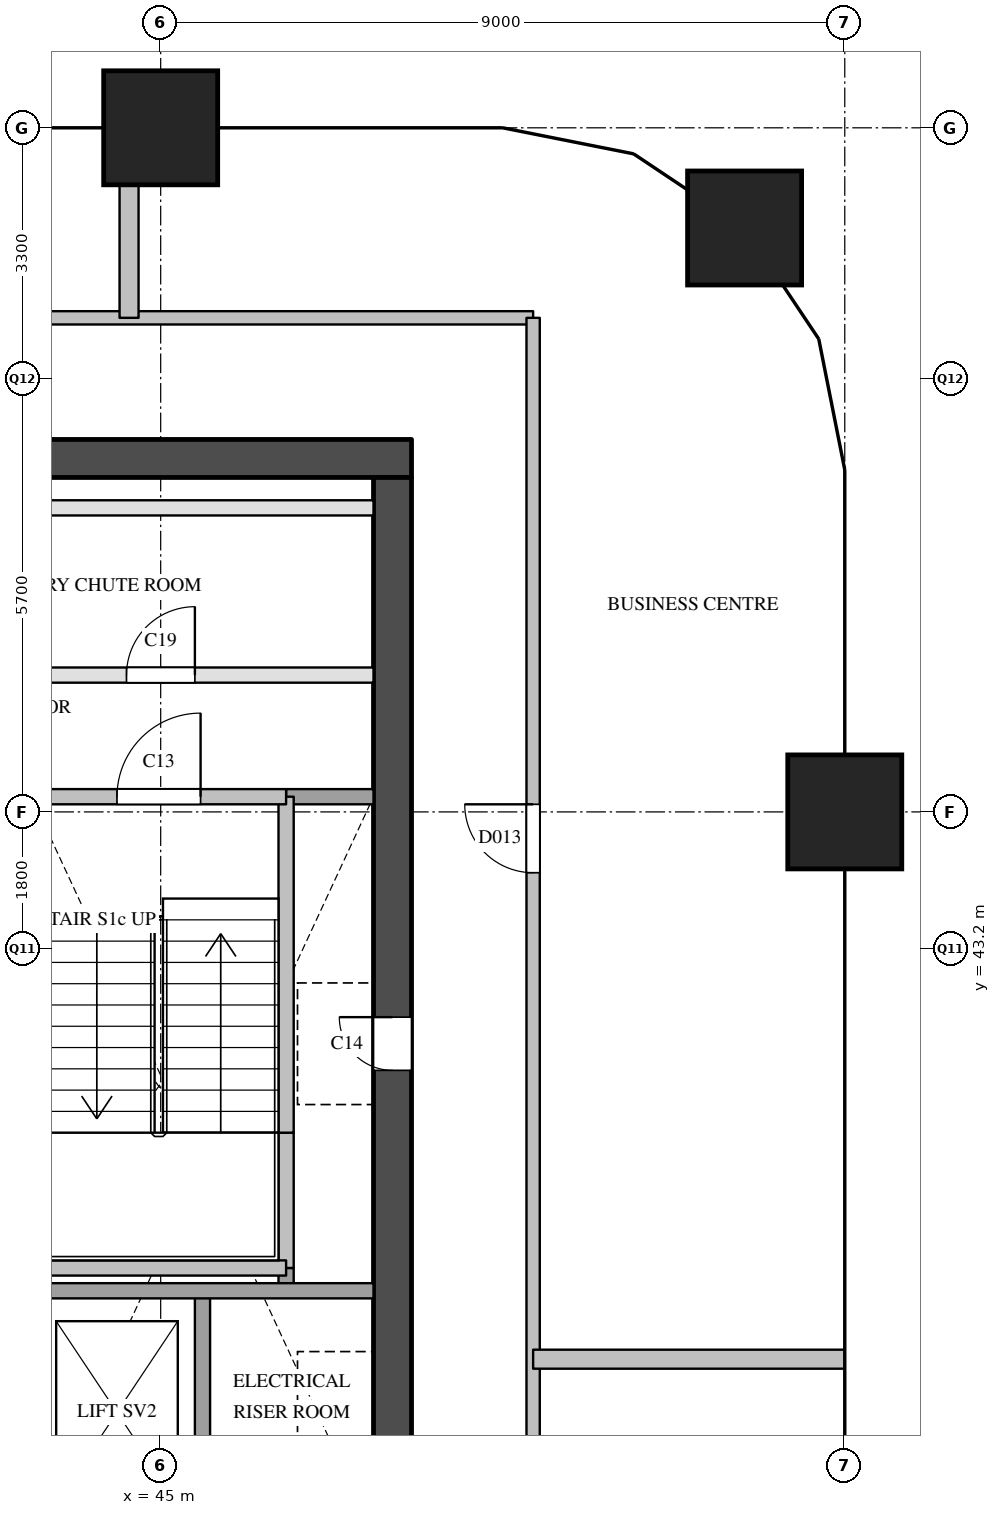
"""IFC4 building model, lengths in metres.
Left out: names, types, materials, properties, quantities, classifications, styles, units other than length and angle.
Written with IfcOpenShell. Run it as: python <this file> out.ifc"""

import sys

from ifc_helpers import new_model, si_unit, direction, frame, frame_2d, origin, origin_2d, place, context, subcontext, project, spatial, rectangle, extrude, element, fill, save


model = new_model("IFC4")
c1 = context("Model", 3, precision=1e-05, world=origin(), true_north=direction((0.0, 1.0)))
c2 = subcontext(c1, "Body", "Model", "MODEL_VIEW")
j1 = project(units=[si_unit("LENGTHUNIT", "METRE"), si_unit("PLANEANGLEUNIT", "RADIAN")], contexts=[c1])
p1 = place(None, origin())
s1 = spatial("IfcSite", under=j1, at=p1, CompositionType="ELEMENT")
p2 = place(p1, origin())
s2 = spatial("IfcBuilding", under=s1, at=p2, CompositionType="ELEMENT")
p3 = place(p2, frame((0.0, 0.0, 189.5)))
s3 = spatial("IfcBuildingStorey", under=s2, at=p3, CompositionType="ELEMENT", Elevation=189.5)
for number, where, z_axis, x_axis in (
    (1, (45.0, 54.0, 0.0), (0.0, 0.0, 1.0), (1.0, 0.0, 0.0)),
    (2, (54.0, 45.0, 0.0), (0.0, 0.0, 1.0), (1.0, 0.0, 0.0)),
    (3, (52.682, 52.682, 0.0), (0.0, 0.0, 1.0), (1.0, 0.0, 0.0)),
):
    element("IfcColumn", number, at=place(p3, frame(where, z_axis=z_axis, x_axis=x_axis)), inside=s3, PredefinedType="COLUMN", context=c2, shape_type="SweptSolid", body=[
        extrude(rectangle(XDim=1.5, YDim=1.5, at=origin_2d()), origin(), (0.0, 0.0, 1.0), 3.9),
    ])
p4 = place(p3, frame((36.1, 49.65, 0.0), z_axis=(0.0, 0.0, 1.0), x_axis=(1.0, 0.0, 0.0)))
e4 = element("IfcWall", 4, at=p4, inside=s3, PredefinedType="SHEAR", context=c2, shape_type="SweptSolid", body=[
    extrude(rectangle(XDim=12.2, YDim=0.5, at=frame_2d((6.1, 0.0))), origin(), (0.0, 0.0, 1.0), 3.6),
])
p5 = place(p3, frame((48.05, 29.1, 0.0), z_axis=(0.0, 0.0, 1.0), x_axis=(0.0, 1.0, 0.0)))
e5 = element("IfcWall", 5, at=p5, inside=s3, PredefinedType="SHEAR", context=c2, shape_type="SweptSolid", body=[
    extrude(rectangle(XDim=20.3, YDim=0.5, at=frame_2d((10.15, 0.0))), origin(), (0.0, 0.0, 1.0), 3.6),
])
p6 = place(p5, frame((12.5, 0.0, 0.0)))
e6 = element("IfcOpeningElement", 6, at=p6, cuts=e5, PredefinedType="OPENING", context=c2, shape_type="SweptSolid", body=[
    extrude(rectangle(XDim=0.7, YDim=2.1, at=frame_2d((0.35, 1.05))), frame((0.0, 0.26, 0.0), z_axis=(0.0, -1.0, 0.0), x_axis=(1.0, 0.0, 0.0)), (0.0, 0.0, 1.0), 0.52),
])
p7 = place(p5, frame((3.9, 0.0, 0.0)))
e7 = element("IfcOpeningElement", 7, at=p7, cuts=e5, PredefinedType="OPENING", context=c2, shape_type="SweptSolid", body=[
    extrude(rectangle(XDim=1.8, YDim=2.1, at=frame_2d((0.9, 1.05))), frame((0.0, 0.26, 0.0), z_axis=(0.0, -1.0, 0.0), x_axis=(1.0, 0.0, 0.0)), (0.0, 0.0, 1.0), 0.52),
])
p8 = place(p3, frame((45.55, 35.5, 0.0), z_axis=(0.0, 0.0, 1.0), x_axis=(0.0, 1.0, 0.0)))
e8 = element("IfcWall", 8, at=p8, inside=s3, PredefinedType="SOLIDWALL", context=c2, shape_type="SweptSolid", body=[
    extrude(rectangle(XDim=3.2, YDim=0.2, at=frame_2d((1.6, 0.0))), origin(), (0.0, 0.0, 1.0), 3.6),
])
p9 = place(p3, frame((46.65, 38.7, 0.0), z_axis=(0.0, 0.0, 1.0), x_axis=(0.0, 1.0, 0.0)))
e9 = element("IfcWall", 9, at=p9, inside=s3, PredefinedType="SOLIDWALL", context=c2, shape_type="SweptSolid", body=[
    extrude(rectangle(XDim=0.3, YDim=0.2, at=frame_2d((0.15, 0.0))), origin(), (0.0, 0.0, 1.0), 3.6),
])
p10 = place(p3, frame((46.65, 39.0, 0.0), z_axis=(0.0, 0.0, 1.0), x_axis=(0.0, 1.0, 0.0)))
e10 = element("IfcWall", 10, at=p10, inside=s3, PredefinedType="SOLIDWALL", context=c2, shape_type="SweptSolid", body=[
    extrude(rectangle(XDim=1.78, YDim=0.2, at=frame_2d((0.89, 0.0))), origin(), (0.0, 0.0, 1.0), 3.6),
])
p11 = place(p3, frame((46.65, 40.78, 0.0), z_axis=(0.0, 0.0, 1.0), x_axis=(0.0, 1.0, 0.0)))
e11 = element("IfcWall", 11, at=p11, inside=s3, PredefinedType="SOLIDWALL", context=c2, shape_type="SweptSolid", body=[
    extrude(rectangle(XDim=4.42, YDim=0.2, at=frame_2d((2.21, 0.0))), origin(), (0.0, 0.0, 1.0), 3.6),
])
p12 = place(p3, frame((43.3, 38.7, 0.0), z_axis=(0.0, 0.0, 1.0), x_axis=(1.0, 0.0, 0.0)))
e12 = element("IfcWall", 12, at=p12, inside=s3, PredefinedType="SOLIDWALL", context=c2, shape_type="SweptSolid", body=[
    extrude(rectangle(XDim=4.5, YDim=0.2, at=frame_2d((2.25, 0.0))), origin(), (0.0, 0.0, 1.0), 3.6),
])
p13 = place(p3, frame((43.4, 39.0, 0.0), z_axis=(0.0, 0.0, 1.0), x_axis=(1.0, 0.0, 0.0)))
e13 = element("IfcWall", 13, at=p13, inside=s3, PredefinedType="SOLIDWALL", context=c2, shape_type="SweptSolid", body=[
    extrude(rectangle(XDim=3.25, YDim=0.2, at=frame_2d((1.625, 0.0))), origin(), (0.0, 0.0, 1.0), 3.6),
])
p14 = place(p3, frame((46.65, 45.2, 0.0), z_axis=(0.0, 0.0, 1.0), x_axis=(1.0, 0.0, 0.0)))
e14 = element("IfcWall", 14, at=p14, inside=s3, PredefinedType="SOLIDWALL", context=c2, shape_type="SweptSolid", body=[
    extrude(rectangle(XDim=1.15, YDim=0.2, at=frame_2d((0.575, 0.0))), origin(), (0.0, 0.0, 1.0), 3.6),
])
p15 = place(p3, frame((36.6, 45.2, 0.0), z_axis=(0.0, 0.0, 1.0), x_axis=(1.0, 0.0, 0.0)))
e15 = element("IfcWall", 15, at=p15, inside=s3, PredefinedType="SOLIDWALL", context=c2, shape_type="SweptSolid", body=[
    extrude(rectangle(XDim=10.05, YDim=0.2, at=frame_2d((5.025, 0.0))), origin(), (0.0, 0.0, 1.0), 3.6),
])
p16 = place(p15, frame((1.125, 0.0, 0.0)))
e16 = element("IfcOpeningElement", 16, at=p16, cuts=e15, PredefinedType="OPENING", context=c2, shape_type="SweptSolid", body=[
    extrude(rectangle(XDim=1.1, YDim=2.1, at=frame_2d((0.55, 1.05))), frame((0.0, 0.11, 0.0), z_axis=(0.0, -1.0, 0.0), x_axis=(1.0, 0.0, 0.0)), (0.0, 0.0, 1.0), 0.22),
])
p17 = place(p15, frame((4.475, 0.0, 0.0)))
e17 = element("IfcOpeningElement", 17, at=p17, cuts=e15, PredefinedType="OPENING", context=c2, shape_type="SweptSolid", body=[
    extrude(rectangle(XDim=1.1, YDim=2.1, at=frame_2d((0.55, 1.05))), frame((0.0, 0.11, 0.0), z_axis=(0.0, -1.0, 0.0), x_axis=(1.0, 0.0, 0.0)), (0.0, 0.0, 1.0), 0.22),
])
p18 = place(p15, frame((7.825, 0.0, 0.0)))
e18 = element("IfcOpeningElement", 18, at=p18, cuts=e15, PredefinedType="OPENING", context=c2, shape_type="SweptSolid", body=[
    extrude(rectangle(XDim=1.1, YDim=2.1, at=frame_2d((0.55, 1.05))), frame((0.0, 0.11, 0.0), z_axis=(0.0, -1.0, 0.0), x_axis=(1.0, 0.0, 0.0)), (0.0, 0.0, 1.0), 0.22),
])
p19 = place(p3, frame((36.6, 46.8, 0.0), z_axis=(0.0, 0.0, 1.0), x_axis=(1.0, 0.0, 0.0)))
e19 = element("IfcWall", 19, at=p19, inside=s3, PredefinedType="PARTITIONING", context=c2, shape_type="SweptSolid", body=[
    extrude(rectangle(XDim=11.2, YDim=0.2, at=frame_2d((5.6, 0.0))), origin(), (0.0, 0.0, 1.0), 3.6),
])
p20 = place(p19, frame((2.35, 0.0, 0.0)))
e20 = element("IfcOpeningElement", 20, at=p20, cuts=e19, PredefinedType="OPENING", context=c2, shape_type="SweptSolid", body=[
    extrude(rectangle(XDim=0.9, YDim=2.1, at=frame_2d((0.45, 1.05))), frame((0.0, 0.11, 0.0), z_axis=(0.0, -1.0, 0.0), x_axis=(1.0, 0.0, 0.0)), (0.0, 0.0, 1.0), 0.22),
])
p21 = place(p19, frame((7.95, 0.0, 0.0)))
e21 = element("IfcOpeningElement", 21, at=p21, cuts=e19, PredefinedType="OPENING", context=c2, shape_type="SweptSolid", body=[
    extrude(rectangle(XDim=0.9, YDim=2.1, at=frame_2d((0.45, 1.05))), frame((0.0, 0.11, 0.0), z_axis=(0.0, -1.0, 0.0), x_axis=(1.0, 0.0, 0.0)), (0.0, 0.0, 1.0), 0.22),
])
p22 = place(p3, frame((36.6, 49.0, 0.0), z_axis=(0.0, 0.0, 1.0), x_axis=(1.0, 0.0, 0.0)))
e22 = element("IfcWall", 22, at=p22, inside=s3, PredefinedType="PARTITIONING", context=c2, shape_type="SweptSolid", body=[
    extrude(rectangle(XDim=11.2, YDim=0.2, at=frame_2d((5.6, 0.0))), origin(), (0.0, 0.0, 1.0), 3.6),
])
p23 = place(p3, frame((34.5, 51.5, 0.0), z_axis=(0.0, 0.0, 1.0), x_axis=(1.0, 0.0, 0.0)))
e23 = element("IfcWall", 23, at=p23, inside=s3, PredefinedType="PARTITIONING", context=c2, shape_type="SweptSolid", body=[
    extrude(rectangle(XDim=15.4, YDim=0.175, at=frame_2d((7.7, 0.0))), origin(), (0.0, 0.0, 1.0), 3.6),
])
p24 = place(p23, frame((4.542, 0.0, 0.0)))
e24 = element("IfcOpeningElement", 24, at=p24, cuts=e23, PredefinedType="OPENING", context=c2, shape_type="SweptSolid", body=[
    extrude(rectangle(XDim=1.0, YDim=2.1, at=frame_2d((0.5, 1.05))), frame((0.0, 0.097, 0.0), z_axis=(0.0, -1.0, 0.0), x_axis=(1.0, 0.0, 0.0)), (0.0, 0.0, 1.0), 0.195),
])
p25 = place(p3, frame((49.9, 28.5, 0.0), z_axis=(0.0, 0.0, 1.0), x_axis=(0.0, 1.0, 0.0)))
e25 = element("IfcWall", 25, at=p25, inside=s3, PredefinedType="PARTITIONING", context=c2, shape_type="SweptSolid", body=[
    extrude(rectangle(XDim=23.0, YDim=0.175, at=frame_2d((11.5, 0.0))), origin(), (0.0, 0.0, 1.0), 3.6),
])
p26 = place(p25, frame((4.2, 0.0, 0.0)))
e26 = element("IfcOpeningElement", 26, at=p26, cuts=e25, PredefinedType="OPENING", context=c2, shape_type="SweptSolid", body=[
    extrude(rectangle(XDim=0.9, YDim=2.1, at=frame_2d((0.45, 1.05))), frame((0.0, 0.097, 0.0), z_axis=(0.0, -1.0, 0.0), x_axis=(1.0, 0.0, 0.0)), (0.0, 0.0, 1.0), 0.195),
])
p27 = place(p25, frame((15.7, 0.0, 0.0)))
e27 = element("IfcOpeningElement", 27, at=p27, cuts=e25, PredefinedType="OPENING", context=c2, shape_type="SweptSolid", body=[
    extrude(rectangle(XDim=0.9, YDim=2.1, at=frame_2d((0.45, 1.05))), frame((0.0, 0.097, 0.0), z_axis=(0.0, -1.0, 0.0), x_axis=(1.0, 0.0, 0.0)), (0.0, 0.0, 1.0), 0.195),
])
p28 = place(p3, frame((49.9, 37.8, 0.0), z_axis=(0.0, 0.0, 1.0), x_axis=(1.0, 0.0, 0.0)))
e28 = element("IfcWall", 28, at=p28, inside=s3, PredefinedType="PARTITIONING", context=c2, shape_type="SweptSolid", body=[
    extrude(rectangle(XDim=4.1, YDim=0.25, at=frame_2d((2.05, 0.0))), origin(), (0.0, 0.0, 1.0), 2.6),
])
p29 = place(p3, frame((44.584, 51.5, 0.0), z_axis=(0.0, 0.0, 1.0), x_axis=(0.0, 1.0, 0.0)))
e29 = element("IfcWall", 29, at=p29, inside=s3, PredefinedType="PARTITIONING", context=c2, shape_type="SweptSolid", body=[
    extrude(rectangle(XDim=2.5, YDim=0.25, at=frame_2d((1.25, 0.0))), origin(), (0.0, 0.0, 1.0), 3.6),
])
p30 = place(p18, origin())
e30 = element("IfcDoor", 30, at=p30, inside=s3, OperationType="SINGLE_SWING_RIGHT", PredefinedType="DOOR", context=c2, shape_type="SweptSolid", body=[
    extrude(rectangle(XDim=1.1, YDim=2.1, at=frame_2d((0.55, 1.05))), frame((0.0, 0.025, 0.0), z_axis=(0.0, -1.0, 0.0), x_axis=(1.0, 0.0, 0.0)), (0.0, 0.0, 1.0), 0.05),
])
fill(e18, e30)
p31 = place(p6, origin())
e31 = element("IfcDoor", 31, at=p31, inside=s3, OperationType="SINGLE_SWING_RIGHT", PredefinedType="DOOR", context=c2, shape_type="SweptSolid", body=[
    extrude(rectangle(XDim=0.7, YDim=2.1, at=frame_2d((0.35, 1.05))), frame((0.0, 0.025, 0.0), z_axis=(0.0, -1.0, 0.0), x_axis=(1.0, 0.0, 0.0)), (0.0, 0.0, 1.0), 0.05),
])
fill(e6, e31)
p32 = place(p21, origin())
e32 = element("IfcDoor", 32, at=p32, inside=s3, OperationType="SINGLE_SWING_RIGHT", PredefinedType="DOOR", context=c2, shape_type="SweptSolid", body=[
    extrude(rectangle(XDim=0.9, YDim=2.1, at=frame_2d((0.45, 1.05))), frame((0.0, 0.025, 0.0), z_axis=(0.0, -1.0, 0.0), x_axis=(1.0, 0.0, 0.0)), (0.0, 0.0, 1.0), 0.05),
])
fill(e21, e32)
p33 = place(p27, origin())
e33 = element("IfcDoor", 33, at=p33, inside=s3, OperationType="SINGLE_SWING_RIGHT", PredefinedType="DOOR", context=c2, shape_type="SweptSolid", body=[
    extrude(rectangle(XDim=0.9, YDim=2.1, at=frame_2d((0.45, 1.05))), frame((0.0, 0.025, 0.0), z_axis=(0.0, -1.0, 0.0), x_axis=(1.0, 0.0, 0.0)), (0.0, 0.0, 1.0), 0.05),
])
fill(e27, e33)
save(model, sys.argv[1])
